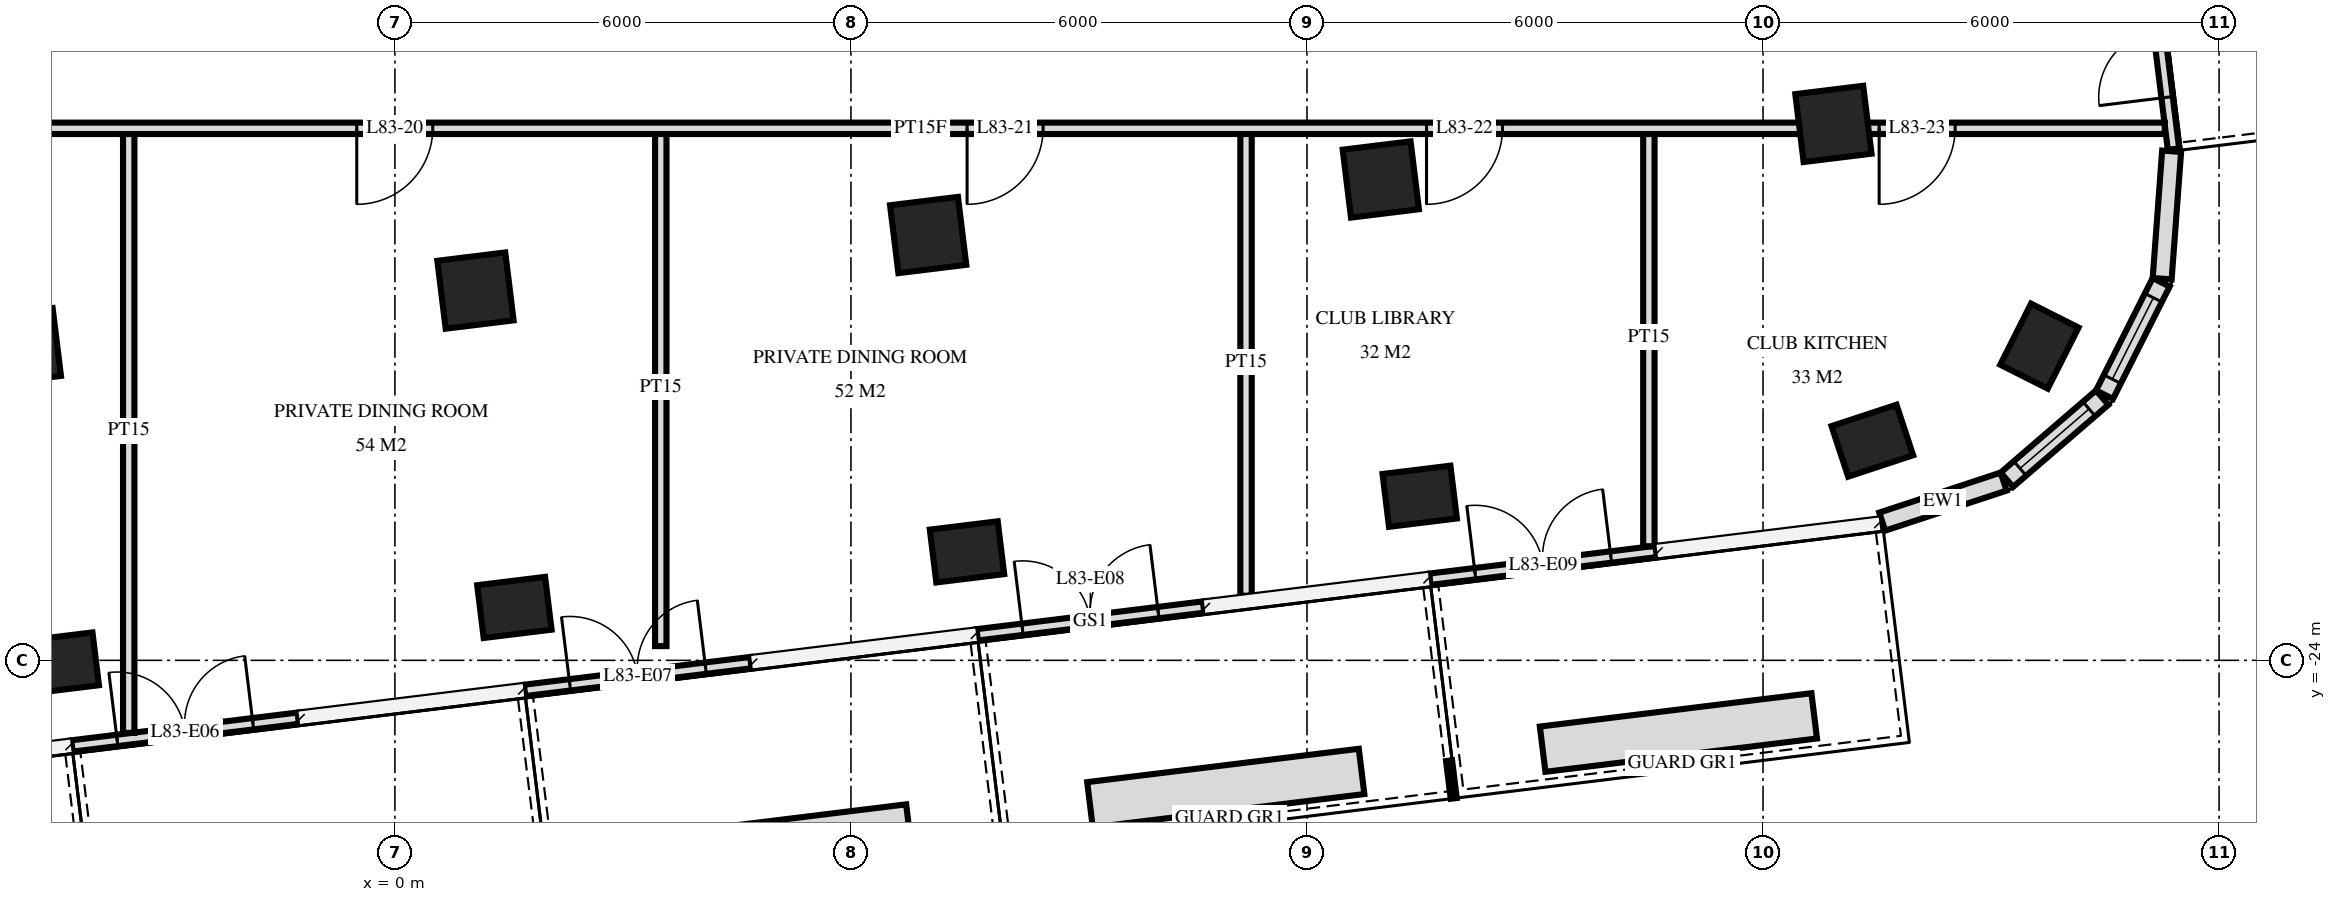
"""IFC4 building model, lengths in metres.
Left out: names, types, materials, properties, quantities, classifications, styles, units other than length and angle.
Written with IfcOpenShell. Run it as: python <this file> out.ifc"""

import sys

from ifc_helpers import new_model, si_unit, direction, frame, frame_2d, origin, origin_2d, place, context, subcontext, project, spatial, rectangle, extrude, element, fill, save


model = new_model("IFC4")
c1 = context("Model", 3, precision=1e-05, world=origin(), true_north=direction((0.0, 1.0)))
c2 = subcontext(c1, "Body", "Model", "MODEL_VIEW")
j1 = project(units=[si_unit("LENGTHUNIT", "METRE"), si_unit("PLANEANGLEUNIT", "RADIAN")], contexts=[c1])
p1 = place(None, origin())
s1 = spatial("IfcSite", under=j1, at=p1, CompositionType="ELEMENT")
p2 = place(p1, origin())
s2 = spatial("IfcBuilding", under=s1, at=p2, CompositionType="ELEMENT")
p3 = place(p2, frame((0.0, 0.0, 314.6)))
s3 = spatial("IfcBuildingStorey", under=s2, at=p3, CompositionType="ELEMENT", Elevation=314.6)
p4 = place(p3, frame((-4.895, -19.866, -0.28), z_axis=(0.0, 0.0, 1.0), x_axis=(0.992546151641, 0.121869343405, 0.0)))
e1 = element("IfcColumn", 1, at=p4, inside=s3, PredefinedType="COLUMN", context=c2, shape_type="SweptSolid", body=[
    extrude(rectangle(XDim=0.9, YDim=0.9, at=origin_2d()), origin(), (0.0, 0.0, 1.0), 4.28),
])
p5 = place(p3, frame((-4.383, -24.035, -0.28), z_axis=(0.0, 0.0, 1.0), x_axis=(0.992546151641, 0.121869343405, 0.0)))
e2 = element("IfcColumn", 2, at=p5, inside=s3, PredefinedType="COLUMN", context=c2, shape_type="SweptSolid", body=[
    extrude(rectangle(XDim=0.9, YDim=0.7, at=origin_2d()), origin(), (0.0, 0.0, 1.0), 4.28),
])
p6 = place(p3, frame((1.06, -19.135, -0.28), z_axis=(0.0, 0.0, 1.0), x_axis=(0.992546151641, 0.121869343405, 0.0)))
e3 = element("IfcColumn", 3, at=p6, inside=s3, PredefinedType="COLUMN", context=c2, shape_type="SweptSolid", body=[
    extrude(rectangle(XDim=0.9, YDim=0.9, at=origin_2d()), origin(), (0.0, 0.0, 1.0), 4.28),
])
p7 = place(p3, frame((1.572, -23.304, -0.28), z_axis=(0.0, 0.0, 1.0), x_axis=(0.992546151641, 0.121869343405, 0.0)))
e4 = element("IfcColumn", 4, at=p7, inside=s3, PredefinedType="COLUMN", context=c2, shape_type="SweptSolid", body=[
    extrude(rectangle(XDim=0.9, YDim=0.7, at=origin_2d()), origin(), (0.0, 0.0, 1.0), 4.28),
])
p8 = place(p3, frame((7.016, -18.404, -0.28), z_axis=(0.0, 0.0, 1.0), x_axis=(0.992546151641, 0.121869343405, 0.0)))
e5 = element("IfcColumn", 5, at=p8, inside=s3, PredefinedType="COLUMN", context=c2, shape_type="SweptSolid", body=[
    extrude(rectangle(XDim=0.9, YDim=0.9, at=origin_2d()), origin(), (0.0, 0.0, 1.0), 4.28),
])
p9 = place(p3, frame((7.527, -22.573, -0.28), z_axis=(0.0, 0.0, 1.0), x_axis=(0.992546151641, 0.121869343405, 0.0)))
e6 = element("IfcColumn", 6, at=p9, inside=s3, PredefinedType="COLUMN", context=c2, shape_type="SweptSolid", body=[
    extrude(rectangle(XDim=0.9, YDim=0.7, at=origin_2d()), origin(), (0.0, 0.0, 1.0), 4.28),
])
p10 = place(p3, frame((12.971, -17.673, -0.28), z_axis=(0.0, 0.0, 1.0), x_axis=(0.992546151641, 0.121869343405, 0.0)))
e7 = element("IfcColumn", 7, at=p10, inside=s3, PredefinedType="COLUMN", context=c2, shape_type="SweptSolid", body=[
    extrude(rectangle(XDim=0.9, YDim=0.9, at=origin_2d()), origin(), (0.0, 0.0, 1.0), 4.28),
])
p11 = place(p3, frame((13.483, -21.841, -0.28), z_axis=(0.0, 0.0, 1.0), x_axis=(0.992546151641, 0.121869343405, 0.0)))
e8 = element("IfcColumn", 8, at=p11, inside=s3, PredefinedType="COLUMN", context=c2, shape_type="SweptSolid", body=[
    extrude(rectangle(XDim=0.9, YDim=0.7, at=origin_2d()), origin(), (0.0, 0.0, 1.0), 4.28),
])
p12 = place(p3, frame((18.926, -16.942, -0.28), z_axis=(0.0, 0.0, 1.0), x_axis=(0.992546151641, 0.121869343405, 0.0)))
e9 = element("IfcColumn", 9, at=p12, inside=s3, PredefinedType="COLUMN", context=c2, shape_type="SweptSolid", body=[
    extrude(rectangle(XDim=0.9, YDim=0.9, at=origin_2d()), origin(), (0.0, 0.0, 1.0), 4.28),
])
for number, where, z_axis, x_axis in (
    (10, (19.438, -21.11, -0.28), (0.0, 0.0, 1.0), (0.95, 0.313, 0.0)),
    (11, (21.636, -19.866, -0.28), (0.0, 0.0, 1.0), (0.45, 0.893, 0.0)),
):
    element("IfcColumn", number, at=place(p3, frame(where, z_axis=z_axis, x_axis=x_axis)), inside=s3, PredefinedType="COLUMN", context=c2, shape_type="SweptSolid", body=[
        extrude(rectangle(XDim=0.9, YDim=0.7, at=origin_2d()), origin(), (0.0, 0.0, 1.0), 4.28),
    ])
p13 = place(p3, frame((-4.249, -25.127, 0.0), z_axis=(0.0, 0.0, 1.0), x_axis=(0.99255088108, 0.121830819037, 0.0)))
e12 = element("IfcWall", 12, at=p13, inside=s3, PredefinedType="USERDEFINED", context=c2, shape_type="SweptSolid", body=[
    extrude(rectangle(XDim=3.0, YDim=0.15, at=frame_2d((1.5, 0.0))), origin(), (0.0, 0.0, 1.0), 3.72),
])
p14 = place(p13, frame((0.6, 0.0, 0.0)))
e13 = element("IfcOpeningElement", 13, at=p14, cuts=e12, PredefinedType="OPENING", context=c2, shape_type="SweptSolid", body=[
    extrude(rectangle(XDim=1.8, YDim=2.4, at=frame_2d((0.9, 1.2))), frame((0.0, 0.085, 0.0), z_axis=(0.0, -1.0, 0.0), x_axis=(1.0, 0.0, 0.0)), (0.0, 0.0, 1.0), 0.17),
])
p15 = place(p3, frame((1.706, -24.396, 0.0), z_axis=(0.0, 0.0, 1.0), x_axis=(0.99255088108, 0.121830819037, 0.0)))
e14 = element("IfcWall", 14, at=p15, inside=s3, PredefinedType="USERDEFINED", context=c2, shape_type="SweptSolid", body=[
    extrude(rectangle(XDim=3.0, YDim=0.15, at=frame_2d((1.5, 0.0))), origin(), (0.0, 0.0, 1.0), 3.72),
])
p16 = place(p15, frame((0.6, 0.0, 0.0)))
e15 = element("IfcOpeningElement", 15, at=p16, cuts=e14, PredefinedType="OPENING", context=c2, shape_type="SweptSolid", body=[
    extrude(rectangle(XDim=1.8, YDim=2.4, at=frame_2d((0.9, 1.2))), frame((0.0, 0.085, 0.0), z_axis=(0.0, -1.0, 0.0), x_axis=(1.0, 0.0, 0.0)), (0.0, 0.0, 1.0), 0.17),
])
p17 = place(p3, frame((7.661, -23.664, 0.0), z_axis=(0.0, 0.0, 1.0), x_axis=(0.992552088886, 0.121820978688, 0.0)))
e16 = element("IfcWall", 16, at=p17, inside=s3, PredefinedType="USERDEFINED", context=c2, shape_type="SweptSolid", body=[
    extrude(rectangle(XDim=3.0, YDim=0.15, at=frame_2d((1.5, 0.0))), origin(), (0.0, 0.0, 1.0), 3.72),
])
p18 = place(p17, frame((0.6, 0.0, 0.0)))
e17 = element("IfcOpeningElement", 17, at=p18, cuts=e16, PredefinedType="OPENING", context=c2, shape_type="SweptSolid", body=[
    extrude(rectangle(XDim=1.8, YDim=2.4, at=frame_2d((0.9, 1.2))), frame((0.0, 0.085, 0.0), z_axis=(0.0, -1.0, 0.0), x_axis=(1.0, 0.0, 0.0)), (0.0, 0.0, 1.0), 0.17),
])
p19 = place(p3, frame((13.617, -22.933, 0.0), z_axis=(0.0, 0.0, 1.0), x_axis=(0.99255088108, 0.121830819037, 0.0)))
e18 = element("IfcWall", 18, at=p19, inside=s3, PredefinedType="USERDEFINED", context=c2, shape_type="SweptSolid", body=[
    extrude(rectangle(XDim=3.0, YDim=0.15, at=frame_2d((1.5, 0.0))), origin(), (0.0, 0.0, 1.0), 3.72),
])
p20 = place(p19, frame((0.6, 0.0, 0.0)))
e19 = element("IfcOpeningElement", 19, at=p20, cuts=e18, PredefinedType="OPENING", context=c2, shape_type="SweptSolid", body=[
    extrude(rectangle(XDim=1.8, YDim=2.4, at=frame_2d((0.9, 1.2))), frame((0.0, 0.085, 0.0), z_axis=(0.0, -1.0, 0.0), x_axis=(1.0, 0.0, 0.0)), (0.0, 0.0, 1.0), 0.17),
])
p21 = place(p3, frame((19.568, -22.175, 0.0), z_axis=(0.0, 0.0, 1.0), x_axis=(0.949694735798, 0.313177120489, 0.0)))
e20 = element("IfcWall", 20, at=p21, inside=s3, PredefinedType="SOLIDWALL", context=c2, shape_type="SweptSolid", body=[
    extrude(rectangle(XDim=1.681, YDim=0.25, at=frame_2d((0.841, 0.0))), origin(), (0.0, 0.0, 1.0), 3.72),
])
p22 = place(p3, frame((21.208, -21.624, 0.0), z_axis=(0.0, 0.0, 1.0), x_axis=(0.757568315466, 0.652755886531, 0.0)))
e21 = element("IfcWall", 21, at=p22, inside=s3, PredefinedType="SOLIDWALL", context=c2, shape_type="SweptSolid", body=[
    extrude(rectangle(XDim=1.656, YDim=0.25, at=frame_2d((0.828, 0.0))), origin(), (0.0, 0.0, 1.0), 3.72),
])
p23 = place(p22, frame((0.228, 0.0, 0.9)))
e22 = element("IfcOpeningElement", 22, at=p23, cuts=e21, PredefinedType="OPENING", context=c2, shape_type="SweptSolid", body=[
    extrude(rectangle(XDim=1.2, YDim=1.5, at=frame_2d((0.6, 0.75))), frame((0.0, 0.135, 0.0), z_axis=(0.0, -1.0, 0.0), x_axis=(1.0, 0.0, 0.0)), (0.0, 0.0, 1.0), 0.27),
])
p24 = place(p3, frame((22.493, -20.505, 0.0), z_axis=(0.0, 0.0, 1.0), x_axis=(0.449982385812, 0.893037430604, 0.0)))
e23 = element("IfcWall", 23, at=p24, inside=s3, PredefinedType="SOLIDWALL", context=c2, shape_type="SweptSolid", body=[
    extrude(rectangle(XDim=1.656, YDim=0.25, at=frame_2d((0.828, 0.0))), origin(), (0.0, 0.0, 1.0), 3.72),
])
p25 = place(p24, frame((0.228, 0.0, 0.9)))
e24 = element("IfcOpeningElement", 24, at=p25, cuts=e23, PredefinedType="OPENING", context=c2, shape_type="SweptSolid", body=[
    extrude(rectangle(XDim=1.2, YDim=1.5, at=frame_2d((0.6, 0.75))), frame((0.0, 0.135, 0.0), z_axis=(0.0, -1.0, 0.0), x_axis=(1.0, 0.0, 0.0)), (0.0, 0.0, 1.0), 0.27),
])
p26 = place(p3, frame((23.251, -18.979, 0.0), z_axis=(0.0, 0.0, 1.0), x_axis=(0.074053534713, 0.997254267475, 0.0)))
e25 = element("IfcWall", 25, at=p26, inside=s3, PredefinedType="SOLIDWALL", context=c2, shape_type="SweptSolid", body=[
    extrude(rectangle(XDim=1.681, YDim=0.25, at=frame_2d((0.841, 0.0))), origin(), (0.0, 0.0, 1.0), 3.72),
])
p27 = place(p3, frame((23.4, -17.274, 0.0), z_axis=(0.0, 0.0, 1.0), x_axis=(-0.121858082248, 0.992547534273, 0.0)))
e26 = element("IfcWall", 26, at=p27, inside=s3, PredefinedType="USERDEFINED", context=c2, shape_type="SweptSolid", body=[
    extrude(rectangle(XDim=3.176, YDim=0.15, at=frame_2d((1.588, 0.0))), origin(), (0.0, 0.0, 1.0), 3.72),
])
p28 = place(p27, frame((0.688, 0.0, 0.0)))
e27 = element("IfcOpeningElement", 27, at=p28, cuts=e26, PredefinedType="OPENING", context=c2, shape_type="SweptSolid", body=[
    extrude(rectangle(XDim=1.8, YDim=2.4, at=frame_2d((0.9, 1.2))), frame((0.0, 0.085, 0.0), z_axis=(0.0, -1.0, 0.0), x_axis=(1.0, 0.0, 0.0)), (0.0, 0.0, 1.0), 0.17),
])
p29 = place(p3, frame((6.763, -26.193, 0.0), z_axis=(0.0, 0.0, 1.0), x_axis=(-0.992546765488, -0.121864343918, 0.0)))
e28 = element("IfcWall", 28, at=p29, inside=s3, PredefinedType="USERDEFINED", context=c2, shape_type="SweptSolid", body=[
    extrude(rectangle(XDim=3.6, YDim=0.6, at=frame_2d((1.8, 0.0))), origin(), (0.0, 0.0, 1.0), 0.65),
])
for number, where, z_axis, x_axis in (
    (29, (12.718, -25.462, 0.0), (0.0, 0.0, 1.0), (-0.993, -0.122, 0.0)),
    (30, (18.673, -24.73, 0.0), (0.0, 0.0, 1.0), (-0.993, -0.122, 0.0)),
):
    element("IfcWall", number, at=place(p3, frame(where, z_axis=z_axis, x_axis=x_axis)), inside=s3, PredefinedType="USERDEFINED", context=c2, shape_type="SweptSolid", body=[
        extrude(rectangle(XDim=3.6, YDim=0.6, at=frame_2d((1.8, 0.0))), origin(), (0.0, 0.0, 1.0), 0.65),
    ])
p30 = place(p3, frame((16.498, -22.499, 0.0), z_axis=(0.0, 0.0, 1.0), x_axis=(0.0, 1.0, 0.0)))
e31 = element("IfcWall", 31, at=p30, inside=s3, PredefinedType="PARTITIONING", context=c2, shape_type="SweptSolid", body=[
    extrude(rectangle(XDim=5.499, YDim=0.15, at=frame_2d((2.75, 0.0))), origin(), (0.0, 0.0, 1.0), 3.72),
])
p31 = place(p3, frame((11.198, -23.15, 0.0), z_axis=(0.0, 0.0, 1.0), x_axis=(0.0, 1.0, 0.0)))
e32 = element("IfcWall", 32, at=p31, inside=s3, PredefinedType="PARTITIONING", context=c2, shape_type="SweptSolid", body=[
    extrude(rectangle(XDim=6.15, YDim=0.15, at=frame_2d((3.075, 0.0))), origin(), (0.0, 0.0, 1.0), 3.72),
])
p32 = place(p3, frame((3.498, -23.813, 0.0), z_axis=(0.0, 0.0, 1.0), x_axis=(0.0, 1.0, 0.0)))
e33 = element("IfcWall", 33, at=p32, inside=s3, PredefinedType="PARTITIONING", context=c2, shape_type="SweptSolid", body=[
    extrude(rectangle(XDim=6.813, YDim=0.15, at=frame_2d((3.406, 0.0))), origin(), (0.0, 0.0, 1.0), 3.72),
])
p33 = place(p3, frame((-3.502, -24.955, 0.0), z_axis=(0.0, 0.0, 1.0), x_axis=(0.0, 1.0, 0.0)))
e34 = element("IfcWall", 34, at=p33, inside=s3, PredefinedType="PARTITIONING", context=c2, shape_type="SweptSolid", body=[
    extrude(rectangle(XDim=7.955, YDim=0.15, at=frame_2d((3.977, 0.0))), origin(), (0.0, 0.0, 1.0), 3.72),
])
p34 = place(p3, frame((-9.461, -17.0, 0.0), z_axis=(0.0, 0.0, 1.0), x_axis=(1.0, 0.0, 0.0)))
e35 = element("IfcWall", 35, at=p34, inside=s3, PredefinedType="PARTITIONING", context=c2, shape_type="SweptSolid", body=[
    extrude(rectangle(XDim=32.747, YDim=0.15, at=frame_2d((16.373, 0.0))), origin(), (0.0, 0.0, 1.0), 3.72),
])
p35 = place(p34, frame((2.489, 0.0, 0.0)))
e36 = element("IfcOpeningElement", 36, at=p35, cuts=e35, PredefinedType="OPENING", context=c2, shape_type="SweptSolid", body=[
    extrude(rectangle(XDim=1.0, YDim=2.1, at=frame_2d((0.5, 1.05))), frame((0.0, 0.085, 0.0), z_axis=(0.0, -1.0, 0.0), x_axis=(1.0, 0.0, 0.0)), (0.0, 0.0, 1.0), 0.17),
])
p36 = place(p34, frame((8.959, 0.0, 0.0)))
e37 = element("IfcOpeningElement", 37, at=p36, cuts=e35, PredefinedType="OPENING", context=c2, shape_type="SweptSolid", body=[
    extrude(rectangle(XDim=1.0, YDim=2.1, at=frame_2d((0.5, 1.05))), frame((0.0, 0.085, 0.0), z_axis=(0.0, -1.0, 0.0), x_axis=(1.0, 0.0, 0.0)), (0.0, 0.0, 1.0), 0.17),
])
p37 = place(p34, frame((16.989, 0.0, 0.0)))
e38 = element("IfcOpeningElement", 38, at=p37, cuts=e35, PredefinedType="OPENING", context=c2, shape_type="SweptSolid", body=[
    extrude(rectangle(XDim=1.0, YDim=2.1, at=frame_2d((0.5, 1.05))), frame((0.0, 0.085, 0.0), z_axis=(0.0, -1.0, 0.0), x_axis=(1.0, 0.0, 0.0)), (0.0, 0.0, 1.0), 0.17),
])
p38 = place(p34, frame((23.033, 0.0, 0.0)))
e39 = element("IfcOpeningElement", 39, at=p38, cuts=e35, PredefinedType="OPENING", context=c2, shape_type="SweptSolid", body=[
    extrude(rectangle(XDim=1.0, YDim=2.1, at=frame_2d((0.5, 1.05))), frame((0.0, 0.085, 0.0), z_axis=(0.0, -1.0, 0.0), x_axis=(1.0, 0.0, 0.0)), (0.0, 0.0, 1.0), 0.17),
])
p39 = place(p34, frame((28.989, 0.0, 0.0)))
e40 = element("IfcOpeningElement", 40, at=p39, cuts=e35, PredefinedType="OPENING", context=c2, shape_type="SweptSolid", body=[
    extrude(rectangle(XDim=1.0, YDim=2.1, at=frame_2d((0.5, 1.05))), frame((0.0, 0.085, 0.0), z_axis=(0.0, -1.0, 0.0), x_axis=(1.0, 0.0, 0.0)), (0.0, 0.0, 1.0), 0.17),
])
p40 = place(p14, origin())
e41 = element("IfcDoor", 41, at=p40, inside=s3, OperationType="DOUBLE_DOOR_SINGLE_SWING", PredefinedType="DOOR", context=c2, shape_type="SweptSolid", body=[
    extrude(rectangle(XDim=1.8, YDim=2.4, at=frame_2d((0.9, 1.2))), frame((0.0, 0.025, 0.0), z_axis=(0.0, -1.0, 0.0), x_axis=(1.0, 0.0, 0.0)), (0.0, 0.0, 1.0), 0.05),
])
fill(e13, e41)
p41 = place(p16, origin())
e42 = element("IfcDoor", 42, at=p41, inside=s3, OperationType="DOUBLE_DOOR_SINGLE_SWING", PredefinedType="DOOR", context=c2, shape_type="SweptSolid", body=[
    extrude(rectangle(XDim=1.8, YDim=2.4, at=frame_2d((0.9, 1.2))), frame((0.0, 0.025, 0.0), z_axis=(0.0, -1.0, 0.0), x_axis=(1.0, 0.0, 0.0)), (0.0, 0.0, 1.0), 0.05),
])
fill(e15, e42)
p42 = place(p18, origin())
e43 = element("IfcDoor", 43, at=p42, inside=s3, OperationType="DOUBLE_DOOR_SINGLE_SWING", PredefinedType="DOOR", context=c2, shape_type="SweptSolid", body=[
    extrude(rectangle(XDim=1.8, YDim=2.4, at=frame_2d((0.9, 1.2))), frame((0.0, 0.025, 0.0), z_axis=(0.0, -1.0, 0.0), x_axis=(1.0, 0.0, 0.0)), (0.0, 0.0, 1.0), 0.05),
])
fill(e17, e43)
p43 = place(p20, origin())
e44 = element("IfcDoor", 44, at=p43, inside=s3, OperationType="DOUBLE_DOOR_SINGLE_SWING", PredefinedType="DOOR", context=c2, shape_type="SweptSolid", body=[
    extrude(rectangle(XDim=1.8, YDim=2.4, at=frame_2d((0.9, 1.2))), frame((0.0, 0.025, 0.0), z_axis=(0.0, -1.0, 0.0), x_axis=(1.0, 0.0, 0.0)), (0.0, 0.0, 1.0), 0.05),
])
fill(e19, e44)
p44 = place(p23, origin())
e45 = element("IfcWindow", 45, at=p44, inside=s3, PartitioningType="SINGLE_PANEL", PredefinedType="WINDOW", context=c2, shape_type="SweptSolid", body=[
    extrude(rectangle(XDim=1.2, YDim=1.5, at=frame_2d((0.6, 0.75))), frame((0.0, 0.03, 0.0), z_axis=(0.0, -1.0, 0.0), x_axis=(1.0, 0.0, 0.0)), (0.0, 0.0, 1.0), 0.06),
])
fill(e22, e45)
p45 = place(p25, origin())
e46 = element("IfcWindow", 46, at=p45, inside=s3, PartitioningType="SINGLE_PANEL", PredefinedType="WINDOW", context=c2, shape_type="SweptSolid", body=[
    extrude(rectangle(XDim=1.2, YDim=1.5, at=frame_2d((0.6, 0.75))), frame((0.0, 0.03, 0.0), z_axis=(0.0, -1.0, 0.0), x_axis=(1.0, 0.0, 0.0)), (0.0, 0.0, 1.0), 0.06),
])
fill(e24, e46)
p46 = place(p28, origin())
e47 = element("IfcDoor", 47, at=p46, inside=s3, OperationType="DOUBLE_DOOR_SINGLE_SWING", PredefinedType="DOOR", context=c2, shape_type="SweptSolid", body=[
    extrude(rectangle(XDim=1.8, YDim=2.4, at=frame_2d((0.9, 1.2))), frame((0.0, 0.025, 0.0), z_axis=(0.0, -1.0, 0.0), x_axis=(1.0, 0.0, 0.0)), (0.0, 0.0, 1.0), 0.05),
])
fill(e27, e47)
p47 = place(p36, frame((0.5, 0.0, 0.0), z_axis=(0.0, 0.0, 1.0), x_axis=(-1.0, 0.0, 0.0)))
e48 = element("IfcDoor", 48, at=p47, inside=s3, OperationType="SINGLE_SWING_LEFT", PredefinedType="DOOR", context=c2, shape_type="SweptSolid", body=[
    extrude(rectangle(XDim=1.0, YDim=2.1, at=frame_2d((0.0, 1.05))), frame((0.0, -0.025, 0.0), z_axis=(0.0, 1.0, 0.0), x_axis=(-1.0, 0.0, 0.0)), (0.0, 0.0, 1.0), 0.05),
])
fill(e37, e48)
p48 = place(p37, frame((0.5, 0.0, 0.0), z_axis=(0.0, 0.0, 1.0), x_axis=(-1.0, 0.0, 0.0)))
e49 = element("IfcDoor", 49, at=p48, inside=s3, OperationType="SINGLE_SWING_LEFT", PredefinedType="DOOR", context=c2, shape_type="SweptSolid", body=[
    extrude(rectangle(XDim=1.0, YDim=2.1, at=frame_2d((0.0, 1.05))), frame((0.0, -0.025, 0.0), z_axis=(0.0, 1.0, 0.0), x_axis=(-1.0, 0.0, 0.0)), (0.0, 0.0, 1.0), 0.05),
])
fill(e38, e49)
p49 = place(p38, frame((0.5, 0.0, 0.0), z_axis=(0.0, 0.0, 1.0), x_axis=(-1.0, 0.0, 0.0)))
e50 = element("IfcDoor", 50, at=p49, inside=s3, OperationType="SINGLE_SWING_LEFT", PredefinedType="DOOR", context=c2, shape_type="SweptSolid", body=[
    extrude(rectangle(XDim=1.0, YDim=2.1, at=frame_2d((0.0, 1.05))), frame((0.0, -0.025, 0.0), z_axis=(0.0, 1.0, 0.0), x_axis=(-1.0, 0.0, 0.0)), (0.0, 0.0, 1.0), 0.05),
])
fill(e39, e50)
p50 = place(p39, frame((0.5, 0.0, 0.0), z_axis=(0.0, 0.0, 1.0), x_axis=(-1.0, 0.0, 0.0)))
e51 = element("IfcDoor", 51, at=p50, inside=s3, OperationType="SINGLE_SWING_LEFT", PredefinedType="DOOR", context=c2, shape_type="SweptSolid", body=[
    extrude(rectangle(XDim=1.0, YDim=2.1, at=frame_2d((0.0, 1.05))), frame((0.0, -0.025, 0.0), z_axis=(0.0, 1.0, 0.0), x_axis=(-1.0, 0.0, 0.0)), (0.0, 0.0, 1.0), 0.05),
])
fill(e40, e51)
save(model, sys.argv[1])
